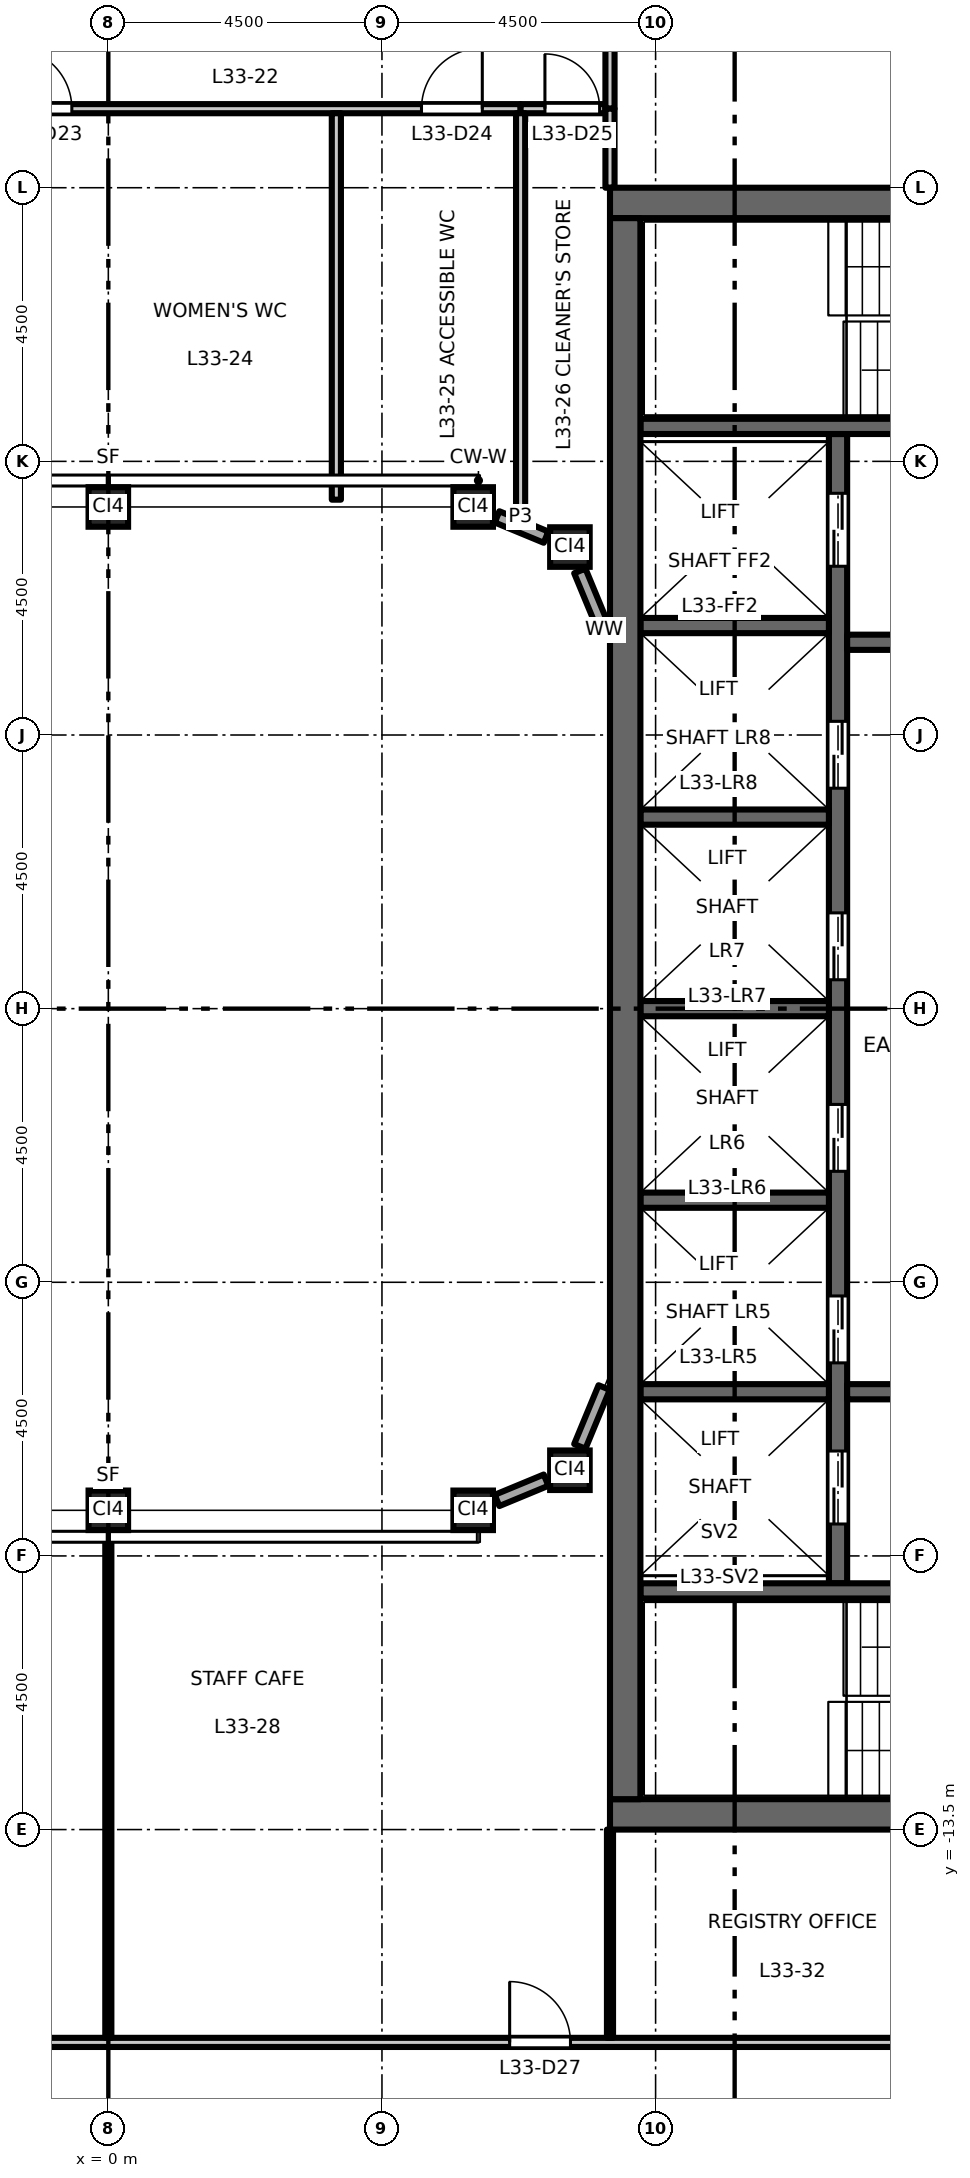
"""IFC4 building model, lengths in metres.
Left out: names, types, materials, properties, quantities, classifications, styles, units other than length and angle.
Written with IfcOpenShell. Run it as: python <this file> out.ifc"""

import sys

from ifc_helpers import new_model, si_unit, direction, frame, frame_2d, origin, origin_2d, place, context, subcontext, project, spatial, rectangle, hollow_rectangle, extrude, element, fill, save


model = new_model("IFC4")
c1 = context("Model", 3, precision=1e-05, world=origin(), true_north=direction((0.0, 1.0)))
c2 = subcontext(c1, "Body", "Model", "MODEL_VIEW")
j1 = project(units=[si_unit("LENGTHUNIT", "METRE"), si_unit("PLANEANGLEUNIT", "RADIAN")], contexts=[c1])
p1 = place(None, origin())
s1 = spatial("IfcSite", under=j1, at=p1, CompositionType="ELEMENT")
p2 = place(p1, origin())
s2 = spatial("IfcBuilding", under=s1, at=p2, CompositionType="ELEMENT")
p3 = place(p2, frame((0.0, 0.0, 154.2)))
s3 = spatial("IfcBuildingStorey", under=s2, at=p3, CompositionType="ELEMENT", Elevation=154.2)
for number, where, z_axis, x_axis in (
    (1, (0.0, -8.25, 0.0), (0.0, 0.0, 1.0), (1.0, 0.0, 0.0)),
    (2, (6.0, -8.25, 0.0), (0.0, 0.0, 1.0), (1.0, 0.0, 0.0)),
    (3, (7.591, -7.591, 0.0), (0.0, 0.0, 1.0), (1.0, 0.0, 0.0)),
    (4, (0.0, 8.25, 0.0), (0.0, 0.0, 1.0), (1.0, 0.0, 0.0)),
    (5, (6.0, 8.25, 0.0), (0.0, 0.0, 1.0), (1.0, 0.0, 0.0)),
    (6, (7.591, 7.591, 0.0), (0.0, 0.0, 1.0), (1.0, 0.0, 0.0)),
):
    element("IfcColumn", number, at=place(p3, frame(where, z_axis=z_axis, x_axis=x_axis)), inside=s3, PredefinedType="COLUMN", context=c2, shape_type="SweptSolid", body=[
        extrude(hollow_rectangle(XDim=0.65, YDim=0.65, WallThickness=0.036, at=origin_2d()), origin(), (0.0, 0.0, 1.0), 4.5),
    ])
p4 = place(p3, frame((12.0, -9.45, 0.0), z_axis=(0.0, 0.0, 1.0), x_axis=(0.0, 1.0, 0.0)))
e7 = element("IfcWall", 7, at=p4, inside=s3, PredefinedType="SHEAR", context=c2, shape_type="SweptSolid", body=[
    extrude(rectangle(XDim=18.9, YDim=0.3, at=frame_2d((9.45, 0.0))), origin(), (0.0, 0.0, 1.0), 4.35),
])
p5 = place(p4, frame((3.625, 0.0, 0.0)))
e8 = element("IfcOpeningElement", 8, at=p5, cuts=e7, PredefinedType="OPENING", context=c2, shape_type="SweptSolid", body=[
    extrude(rectangle(XDim=1.1, YDim=2.1, at=frame_2d((0.55, 1.05))), frame((0.0, 0.16, 0.0), z_axis=(0.0, -1.0, 0.0), x_axis=(1.0, 0.0, 0.0)), (0.0, 0.0, 1.0), 0.32),
])
p6 = place(p4, frame((6.775, 0.0, 0.0)))
e9 = element("IfcOpeningElement", 9, at=p6, cuts=e7, PredefinedType="OPENING", context=c2, shape_type="SweptSolid", body=[
    extrude(rectangle(XDim=1.1, YDim=2.1, at=frame_2d((0.55, 1.05))), frame((0.0, 0.16, 0.0), z_axis=(0.0, -1.0, 0.0), x_axis=(1.0, 0.0, 0.0)), (0.0, 0.0, 1.0), 0.32),
])
p7 = place(p4, frame((9.925, 0.0, 0.0)))
e10 = element("IfcOpeningElement", 10, at=p7, cuts=e7, PredefinedType="OPENING", context=c2, shape_type="SweptSolid", body=[
    extrude(rectangle(XDim=1.1, YDim=2.1, at=frame_2d((0.55, 1.05))), frame((0.0, 0.16, 0.0), z_axis=(0.0, -1.0, 0.0), x_axis=(1.0, 0.0, 0.0)), (0.0, 0.0, 1.0), 0.32),
])
p8 = place(p4, frame((13.075, 0.0, 0.0)))
e11 = element("IfcOpeningElement", 11, at=p8, cuts=e7, PredefinedType="OPENING", context=c2, shape_type="SweptSolid", body=[
    extrude(rectangle(XDim=1.1, YDim=2.1, at=frame_2d((0.55, 1.05))), frame((0.0, 0.16, 0.0), z_axis=(0.0, -1.0, 0.0), x_axis=(1.0, 0.0, 0.0)), (0.0, 0.0, 1.0), 0.32),
])
p9 = place(p4, frame((16.725, 0.0, 0.0)))
e12 = element("IfcOpeningElement", 12, at=p9, cuts=e7, PredefinedType="OPENING", context=c2, shape_type="SweptSolid", body=[
    extrude(rectangle(XDim=1.2, YDim=2.1, at=frame_2d((0.6, 1.05))), frame((0.0, 0.16, 0.0), z_axis=(0.0, -1.0, 0.0), x_axis=(1.0, 0.0, 0.0)), (0.0, 0.0, 1.0), 0.32),
])
p10 = place(p4, frame((0.975, 0.0, 0.0)))
e13 = element("IfcOpeningElement", 13, at=p10, cuts=e7, PredefinedType="OPENING", context=c2, shape_type="SweptSolid", body=[
    extrude(rectangle(XDim=1.2, YDim=2.1, at=frame_2d((0.6, 1.05))), frame((0.0, 0.16, 0.0), z_axis=(0.0, -1.0, 0.0), x_axis=(1.0, 0.0, 0.0)), (0.0, 0.0, 1.0), 0.32),
])
p11 = place(p3, frame((12.15, 6.025, 0.0), z_axis=(0.0, 0.0, 1.0), x_axis=(1.0, 0.0, 0.0)))
e14 = element("IfcWall", 14, at=p11, inside=s3, PredefinedType="SHEAR", context=c2, shape_type="SweptSolid", body=[
    extrude(rectangle(XDim=4.6, YDim=0.25, at=frame_2d((2.3, 0.0))), origin(), (0.0, 0.0, 1.0), 4.35),
])
p12 = place(p11, frame((1.8, 0.0, 0.0)))
e15 = element("IfcOpeningElement", 15, at=p12, cuts=e14, PredefinedType="OPENING", context=c2, shape_type="SweptSolid", body=[
    extrude(rectangle(XDim=1.0, YDim=2.1, at=frame_2d((0.5, 1.05))), frame((0.0, 0.135, 0.0), z_axis=(0.0, -1.0, 0.0), x_axis=(1.0, 0.0, 0.0)), (0.0, 0.0, 1.0), 0.27),
])
p13 = place(p3, frame((12.15, -6.3, 0.0), z_axis=(0.0, 0.0, 1.0), x_axis=(1.0, 0.0, 0.0)))
e16 = element("IfcWall", 16, at=p13, inside=s3, PredefinedType="SHEAR", context=c2, shape_type="SweptSolid", body=[
    extrude(rectangle(XDim=9.1, YDim=0.25, at=frame_2d((4.55, 0.0))), origin(), (0.0, 0.0, 1.0), 4.35),
])
p14 = place(p13, frame((1.8, 0.0, 0.0)))
e17 = element("IfcOpeningElement", 17, at=p14, cuts=e16, PredefinedType="OPENING", context=c2, shape_type="SweptSolid", body=[
    extrude(rectangle(XDim=1.0, YDim=2.1, at=frame_2d((0.5, 1.05))), frame((0.0, 0.135, 0.0), z_axis=(0.0, -1.0, 0.0), x_axis=(1.0, 0.0, 0.0)), (0.0, 0.0, 1.0), 0.27),
])
p15 = place(p13, frame((5.55, 0.0, 0.0)))
e18 = element("IfcOpeningElement", 18, at=p15, cuts=e16, PredefinedType="OPENING", context=c2, shape_type="SweptSolid", body=[
    extrude(rectangle(XDim=0.9, YDim=2.1, at=frame_2d((0.45, 1.05))), frame((0.0, 0.135, 0.0), z_axis=(0.0, -1.0, 0.0), x_axis=(1.0, 0.0, 0.0)), (0.0, 0.0, 1.0), 0.27),
])
p16 = place(p13, frame((7.55, 0.0, 0.0)))
e19 = element("IfcOpeningElement", 19, at=p16, cuts=e16, PredefinedType="OPENING", context=c2, shape_type="SweptSolid", body=[
    extrude(rectangle(XDim=0.9, YDim=2.1, at=frame_2d((0.45, 1.05))), frame((0.0, 0.135, 0.0), z_axis=(0.0, -1.0, 0.0), x_axis=(1.0, 0.0, 0.0)), (0.0, 0.0, 1.0), 0.27),
])
for number, where, z_axis, x_axis in (
    (20, (8.75, 0.0, 0.0), (0.0, 0.0, 1.0), (1.0, 0.0, 0.0)),
    (21, (8.75, 3.15, 0.0), (0.0, 0.0, 1.0), (1.0, 0.0, 0.0)),
    (22, (8.75, 6.3, 0.0), (0.0, 0.0, 1.0), (1.0, 0.0, 0.0)),
    (23, (8.75, -3.15, 0.0), (0.0, 0.0, 1.0), (1.0, 0.0, 0.0)),
    (24, (8.75, -6.3, 0.0), (0.0, 0.0, 1.0), (1.0, 0.0, 0.0)),
):
    element("IfcWall", number, at=place(p3, frame(where, z_axis=z_axis, x_axis=x_axis)), inside=s3, PredefinedType="SHEAR", context=c2, shape_type="SweptSolid", body=[
        extrude(rectangle(XDim=3.1, YDim=0.25, at=frame_2d((1.55, 0.0))), origin(), (0.0, 0.0, 1.0), 4.35),
    ])
p17 = place(p3, frame((8.75, 9.575, 0.0), z_axis=(0.0, 0.0, 1.0), x_axis=(1.0, 0.0, 0.0)))
e25 = element("IfcWall", 25, at=p17, inside=s3, PredefinedType="SHEAR", context=c2, shape_type="SweptSolid", body=[
    extrude(rectangle(XDim=8.0, YDim=0.25, at=frame_2d((4.0, 0.0))), origin(), (0.0, 0.0, 1.0), 4.35),
])
p18 = place(p17, frame((6.65, 0.0, 0.0)))
e26 = element("IfcOpeningElement", 26, at=p18, cuts=e25, PredefinedType="OPENING", context=c2, shape_type="SweptSolid", body=[
    extrude(rectangle(XDim=1.1, YDim=2.1, at=frame_2d((0.55, 1.05))), frame((0.0, 0.135, 0.0), z_axis=(0.0, -1.0, 0.0), x_axis=(1.0, 0.0, 0.0)), (0.0, 0.0, 1.0), 0.27),
])
p19 = place(p3, frame((8.75, -9.575, 0.0), z_axis=(0.0, 0.0, 1.0), x_axis=(1.0, 0.0, 0.0)))
e27 = element("IfcWall", 27, at=p19, inside=s3, PredefinedType="SHEAR", context=c2, shape_type="SweptSolid", body=[
    extrude(rectangle(XDim=8.0, YDim=0.25, at=frame_2d((4.0, 0.0))), origin(), (0.0, 0.0, 1.0), 4.35),
])
p20 = place(p19, frame((6.65, 0.0, 0.0)))
e28 = element("IfcOpeningElement", 28, at=p20, cuts=e27, PredefinedType="OPENING", context=c2, shape_type="SweptSolid", body=[
    extrude(rectangle(XDim=1.1, YDim=2.1, at=frame_2d((0.55, 1.05))), frame((0.0, 0.135, 0.0), z_axis=(0.0, -1.0, 0.0), x_axis=(1.0, 0.0, 0.0)), (0.0, 0.0, 1.0), 0.27),
])
for number, where, z_axis, x_axis in (
    (29, (8.25, 13.25, 0.0), (0.0, 0.0, 1.0), (1.0, 0.0, 0.0)),
    (30, (8.25, -13.25, 0.0), (0.0, 0.0, 1.0), (1.0, 0.0, 0.0)),
):
    element("IfcWall", number, at=place(p3, frame(where, z_axis=z_axis, x_axis=x_axis)), inside=s3, PredefinedType="SHEAR", context=c2, shape_type="SweptSolid", body=[
        extrude(rectangle(XDim=13.5, YDim=0.5, at=frame_2d((6.75, 0.0))), origin(), (0.0, 0.0, 1.0), 4.35),
    ])
p21 = place(p3, frame((8.5, -13.0, 0.0), z_axis=(0.0, 0.0, 1.0), x_axis=(0.0, 1.0, 0.0)))
e31 = element("IfcWall", 31, at=p21, inside=s3, PredefinedType="SHEAR", context=c2, shape_type="SweptSolid", body=[
    extrude(rectangle(XDim=26.0, YDim=0.5, at=frame_2d((13.0, 0.0))), origin(), (0.0, 0.0, 1.0), 4.35),
])
p22 = place(p3, frame((6.392, -8.087, 0.0), z_axis=(0.0, 0.0, 1.0), x_axis=(0.923894108428, 0.382648241093, 0.0)))
e32 = element("IfcWall", 32, at=p22, inside=s3, PredefinedType="STANDARD", context=c2, shape_type="SweptSolid", body=[
    extrude(rectangle(XDim=0.873, YDim=0.2, at=frame_2d((0.437, 0.0))), origin(), (0.0, 0.0, 1.0), 3.826),
])
for number, where, z_axis, x_axis in (
    (33, (7.753, -7.199, 0.0), (0.0, 0.0, 1.0), (0.383, 0.924, 0.0)),
    (34, (8.154, 6.231, 0.0), (0.0, 0.0, 1.0), (-0.383, 0.924, 0.0)),
):
    element("IfcWall", number, at=place(p3, frame(where, z_axis=z_axis, x_axis=x_axis)), inside=s3, PredefinedType="STANDARD", context=c2, shape_type="SweptSolid", body=[
        extrude(rectangle(XDim=1.048, YDim=0.2, at=frame_2d((0.524, 0.0))), origin(), (0.0, 0.0, 1.0), 3.826),
    ])
p23 = place(p3, frame((7.199, 7.753, 0.0), z_axis=(0.0, 0.0, 1.0), x_axis=(-0.923894108428, 0.382648241093, 0.0)))
e35 = element("IfcWall", 35, at=p23, inside=s3, PredefinedType="STANDARD", context=c2, shape_type="SweptSolid", body=[
    extrude(rectangle(XDim=0.873, YDim=0.2, at=frame_2d((0.437, 0.0))), origin(), (0.0, 0.0, 1.0), 3.826),
])
p24 = place(p3, frame((-21.825, -17.0, 0.0), z_axis=(0.0, 0.0, 1.0), x_axis=(1.0, 0.0, 0.0)))
e36 = element("IfcWall", 36, at=p24, inside=s3, PredefinedType="PARTITIONING", context=c2, shape_type="SweptSolid", body=[
    extrude(rectangle(XDim=43.65, YDim=0.15, at=frame_2d((21.825, 0.0))), origin(), (0.0, 0.0, 1.0), 4.35),
])
p25 = place(p24, frame((14.175, 0.0, 0.0)))
e37 = element("IfcOpeningElement", 37, at=p25, cuts=e36, PredefinedType="OPENING", context=c2, shape_type="SweptSolid", body=[
    extrude(rectangle(XDim=1.0, YDim=2.1, at=frame_2d((0.5, 1.05))), frame((0.0, 0.085, 0.0), z_axis=(0.0, -1.0, 0.0), x_axis=(1.0, 0.0, 0.0)), (0.0, 0.0, 1.0), 0.17),
])
p26 = place(p24, frame((28.425, 0.0, 0.0)))
e38 = element("IfcOpeningElement", 38, at=p26, cuts=e36, PredefinedType="OPENING", context=c2, shape_type="SweptSolid", body=[
    extrude(rectangle(XDim=1.0, YDim=2.1, at=frame_2d((0.5, 1.05))), frame((0.0, 0.085, 0.0), z_axis=(0.0, -1.0, 0.0), x_axis=(1.0, 0.0, 0.0)), (0.0, 0.0, 1.0), 0.17),
])
p27 = place(p24, frame((0.675, 0.0, 0.0)))
e39 = element("IfcOpeningElement", 39, at=p27, cuts=e36, PredefinedType="OPENING", context=c2, shape_type="SweptSolid", body=[
    extrude(rectangle(XDim=1.0, YDim=2.1, at=frame_2d((0.5, 1.05))), frame((0.0, 0.085, 0.0), z_axis=(0.0, -1.0, 0.0), x_axis=(1.0, 0.0, 0.0)), (0.0, 0.0, 1.0), 0.17),
])
p28 = place(p24, frame((41.925, 0.0, 0.0)))
e40 = element("IfcOpeningElement", 40, at=p28, cuts=e36, PredefinedType="OPENING", context=c2, shape_type="SweptSolid", body=[
    extrude(rectangle(XDim=1.0, YDim=2.1, at=frame_2d((0.5, 1.05))), frame((0.0, 0.085, 0.0), z_axis=(0.0, -1.0, 0.0), x_axis=(1.0, 0.0, 0.0)), (0.0, 0.0, 1.0), 0.17),
])
p29 = place(p3, frame((-8.175, 14.8, 0.0), z_axis=(0.0, 0.0, 1.0), x_axis=(1.0, 0.0, 0.0)))
e41 = element("IfcWall", 41, at=p29, inside=s3, PredefinedType="PARTITIONING", context=c2, shape_type="SweptSolid", body=[
    extrude(rectangle(XDim=14.955, YDim=0.15, at=frame_2d((7.478, 0.0))), origin(), (0.0, 0.0, 1.0), 4.35),
])
p30 = place(p29, frame((4.325, 0.0, 0.0)))
e42 = element("IfcOpeningElement", 42, at=p30, cuts=e41, PredefinedType="OPENING", context=c2, shape_type="SweptSolid", body=[
    extrude(rectangle(XDim=1.0, YDim=2.1, at=frame_2d((0.5, 1.05))), frame((0.0, 0.085, 0.0), z_axis=(0.0, -1.0, 0.0), x_axis=(1.0, 0.0, 0.0)), (0.0, 0.0, 1.0), 0.17),
])
p31 = place(p29, frame((6.575, 0.0, 0.0)))
e43 = element("IfcOpeningElement", 43, at=p31, cuts=e41, PredefinedType="OPENING", context=c2, shape_type="SweptSolid", body=[
    extrude(rectangle(XDim=1.0, YDim=2.1, at=frame_2d((0.5, 1.05))), frame((0.0, 0.085, 0.0), z_axis=(0.0, -1.0, 0.0), x_axis=(1.0, 0.0, 0.0)), (0.0, 0.0, 1.0), 0.17),
])
p32 = place(p29, frame((13.325, 0.0, 0.0)))
e44 = element("IfcOpeningElement", 44, at=p32, cuts=e41, PredefinedType="OPENING", context=c2, shape_type="SweptSolid", body=[
    extrude(rectangle(XDim=1.0, YDim=2.1, at=frame_2d((0.5, 1.05))), frame((0.0, 0.085, 0.0), z_axis=(0.0, -1.0, 0.0), x_axis=(1.0, 0.0, 0.0)), (0.0, 0.0, 1.0), 0.17),
])
p33 = place(p3, frame((6.78, 14.8, 0.0), z_axis=(0.0, 0.0, 1.0), x_axis=(1.0, 0.0, 0.0)))
e45 = element("IfcWall", 45, at=p33, inside=s3, PredefinedType="PARTITIONING", context=c2, shape_type="SweptSolid", body=[
    extrude(rectangle(XDim=1.395, YDim=0.15, at=frame_2d((0.698, 0.0))), origin(), (0.0, 0.0, 1.0), 4.35),
])
p34 = place(p33, frame((0.4, 0.0, 0.0)))
e46 = element("IfcOpeningElement", 46, at=p34, cuts=e45, PredefinedType="OPENING", context=c2, shape_type="SweptSolid", body=[
    extrude(rectangle(XDim=0.9, YDim=2.1, at=frame_2d((0.45, 1.05))), frame((0.0, 0.085, 0.0), z_axis=(0.0, -1.0, 0.0), x_axis=(1.0, 0.0, 0.0)), (0.0, 0.0, 1.0), 0.17),
])
p35 = place(p3, frame((0.0, -16.925, 0.0), z_axis=(0.0, 0.0, 1.0), x_axis=(0.0, 1.0, 0.0)))
e47 = element("IfcWall", 47, at=p35, inside=s3, PredefinedType="PARTITIONING", context=c2, shape_type="SweptSolid", body=[
    extrude(rectangle(XDim=8.275, YDim=0.1, at=frame_2d((4.138, 0.0))), origin(), (0.0, 0.0, 1.0), 3.45),
])
p36 = place(p3, frame((3.75, 8.37, 0.0), z_axis=(0.0, 0.0, 1.0), x_axis=(0.0, 1.0, 0.0)))
e48 = element("IfcWall", 48, at=p36, inside=s3, PredefinedType="PARTITIONING", context=c2, shape_type="SweptSolid", body=[
    extrude(rectangle(XDim=6.355, YDim=0.15, at=frame_2d((3.177, 0.0))), origin(), (0.0, 0.0, 1.0), 4.35),
])
p37 = place(p3, frame((6.78, 8.087, 0.0), z_axis=(0.0, 0.0, 1.0), x_axis=(0.0, 1.0, 0.0)))
e49 = element("IfcWall", 49, at=p37, inside=s3, PredefinedType="PARTITIONING", context=c2, shape_type="SweptSolid", body=[
    extrude(rectangle(XDim=6.638, YDim=0.15, at=frame_2d((3.319, 0.0))), origin(), (0.0, 0.0, 1.0), 4.35),
])
p38 = place(p3, frame((8.25, -16.925, 0.0), z_axis=(0.0, 0.0, 1.0), x_axis=(0.0, 1.0, 0.0)))
e50 = element("IfcWall", 50, at=p38, inside=s3, PredefinedType="PARTITIONING", context=c2, shape_type="SweptSolid", body=[
    extrude(rectangle(XDim=3.425, YDim=0.1, at=frame_2d((1.712, 0.0))), origin(), (0.0, 0.0, 1.0), 4.35),
])
p39 = place(p3, frame((8.25, 14.8, 0.0), z_axis=(0.0, 0.0, 1.0), x_axis=(0.0, 1.0, 0.0)))
e51 = element("IfcWall", 51, at=p39, inside=s3, PredefinedType="PARTITIONING", context=c2, shape_type="SweptSolid", body=[
    extrude(rectangle(XDim=2.125, YDim=0.15, at=frame_2d((1.062, 0.0))), origin(), (0.0, 0.0, 1.0), 4.35),
])
p40 = place(p3, frame((8.25, 13.5, 0.0), z_axis=(0.0, 0.0, 1.0), x_axis=(0.0, 1.0, 0.0)))
e52 = element("IfcWall", 52, at=p40, inside=s3, PredefinedType="PARTITIONING", context=c2, shape_type="SweptSolid", body=[
    extrude(rectangle(XDim=1.3, YDim=0.15, at=frame_2d((0.65, 0.0))), origin(), (0.0, 0.0, 1.0), 4.35),
])
p41 = place(p5, origin())
e53 = element("IfcDoor", 53, at=p41, inside=s3, OperationType="DOUBLE_DOOR_SLIDING", PredefinedType="DOOR", context=c2, shape_type="SweptSolid", body=[
    extrude(rectangle(XDim=1.1, YDim=2.1, at=frame_2d((0.55, 1.05))), frame((0.0, 0.025, 0.0), z_axis=(0.0, -1.0, 0.0), x_axis=(1.0, 0.0, 0.0)), (0.0, 0.0, 1.0), 0.05),
])
fill(e8, e53)
p42 = place(p6, origin())
e54 = element("IfcDoor", 54, at=p42, inside=s3, OperationType="DOUBLE_DOOR_SLIDING", PredefinedType="DOOR", context=c2, shape_type="SweptSolid", body=[
    extrude(rectangle(XDim=1.1, YDim=2.1, at=frame_2d((0.55, 1.05))), frame((0.0, 0.025, 0.0), z_axis=(0.0, -1.0, 0.0), x_axis=(1.0, 0.0, 0.0)), (0.0, 0.0, 1.0), 0.05),
])
fill(e9, e54)
p43 = place(p7, origin())
e55 = element("IfcDoor", 55, at=p43, inside=s3, OperationType="DOUBLE_DOOR_SLIDING", PredefinedType="DOOR", context=c2, shape_type="SweptSolid", body=[
    extrude(rectangle(XDim=1.1, YDim=2.1, at=frame_2d((0.55, 1.05))), frame((0.0, 0.025, 0.0), z_axis=(0.0, -1.0, 0.0), x_axis=(1.0, 0.0, 0.0)), (0.0, 0.0, 1.0), 0.05),
])
fill(e10, e55)
p44 = place(p8, origin())
e56 = element("IfcDoor", 56, at=p44, inside=s3, OperationType="DOUBLE_DOOR_SLIDING", PredefinedType="DOOR", context=c2, shape_type="SweptSolid", body=[
    extrude(rectangle(XDim=1.1, YDim=2.1, at=frame_2d((0.55, 1.05))), frame((0.0, 0.025, 0.0), z_axis=(0.0, -1.0, 0.0), x_axis=(1.0, 0.0, 0.0)), (0.0, 0.0, 1.0), 0.05),
])
fill(e11, e56)
p45 = place(p9, origin())
e57 = element("IfcDoor", 57, at=p45, inside=s3, OperationType="DOUBLE_DOOR_SLIDING", PredefinedType="DOOR", context=c2, shape_type="SweptSolid", body=[
    extrude(rectangle(XDim=1.2, YDim=2.1, at=frame_2d((0.6, 1.05))), frame((0.0, 0.025, 0.0), z_axis=(0.0, -1.0, 0.0), x_axis=(1.0, 0.0, 0.0)), (0.0, 0.0, 1.0), 0.05),
])
fill(e12, e57)
p46 = place(p10, origin())
e58 = element("IfcDoor", 58, at=p46, inside=s3, OperationType="DOUBLE_DOOR_SLIDING", PredefinedType="DOOR", context=c2, shape_type="SweptSolid", body=[
    extrude(rectangle(XDim=1.2, YDim=2.1, at=frame_2d((0.6, 1.05))), frame((0.0, 0.025, 0.0), z_axis=(0.0, -1.0, 0.0), x_axis=(1.0, 0.0, 0.0)), (0.0, 0.0, 1.0), 0.05),
])
fill(e13, e58)
p47 = place(p31, origin())
e59 = element("IfcDoor", 59, at=p47, inside=s3, OperationType="SINGLE_SWING_LEFT", PredefinedType="DOOR", context=c2, shape_type="SweptSolid", body=[
    extrude(rectangle(XDim=1.0, YDim=2.1, at=frame_2d((0.5, 1.05))), frame((0.0, 0.025, 0.0), z_axis=(0.0, -1.0, 0.0), x_axis=(1.0, 0.0, 0.0)), (0.0, 0.0, 1.0), 0.05),
])
fill(e43, e59)
p48 = place(p32, origin())
e60 = element("IfcDoor", 60, at=p48, inside=s3, OperationType="SINGLE_SWING_RIGHT", PredefinedType="DOOR", context=c2, shape_type="SweptSolid", body=[
    extrude(rectangle(XDim=1.0, YDim=2.1, at=frame_2d((0.5, 1.05))), frame((0.0, 0.025, 0.0), z_axis=(0.0, -1.0, 0.0), x_axis=(1.0, 0.0, 0.0)), (0.0, 0.0, 1.0), 0.05),
])
fill(e44, e60)
p49 = place(p34, origin())
e61 = element("IfcDoor", 61, at=p49, inside=s3, OperationType="SINGLE_SWING_LEFT", PredefinedType="DOOR", context=c2, shape_type="SweptSolid", body=[
    extrude(rectangle(XDim=0.9, YDim=2.1, at=frame_2d((0.45, 1.05))), frame((0.0, 0.025, 0.0), z_axis=(0.0, -1.0, 0.0), x_axis=(1.0, 0.0, 0.0)), (0.0, 0.0, 1.0), 0.05),
])
fill(e46, e61)
p50 = place(p26, origin())
e62 = element("IfcDoor", 62, at=p50, inside=s3, OperationType="SINGLE_SWING_LEFT", PredefinedType="DOOR", context=c2, shape_type="SweptSolid", body=[
    extrude(rectangle(XDim=1.0, YDim=2.1, at=frame_2d((0.5, 1.05))), frame((0.0, 0.025, 0.0), z_axis=(0.0, -1.0, 0.0), x_axis=(1.0, 0.0, 0.0)), (0.0, 0.0, 1.0), 0.05),
])
fill(e38, e62)
save(model, sys.argv[1])
